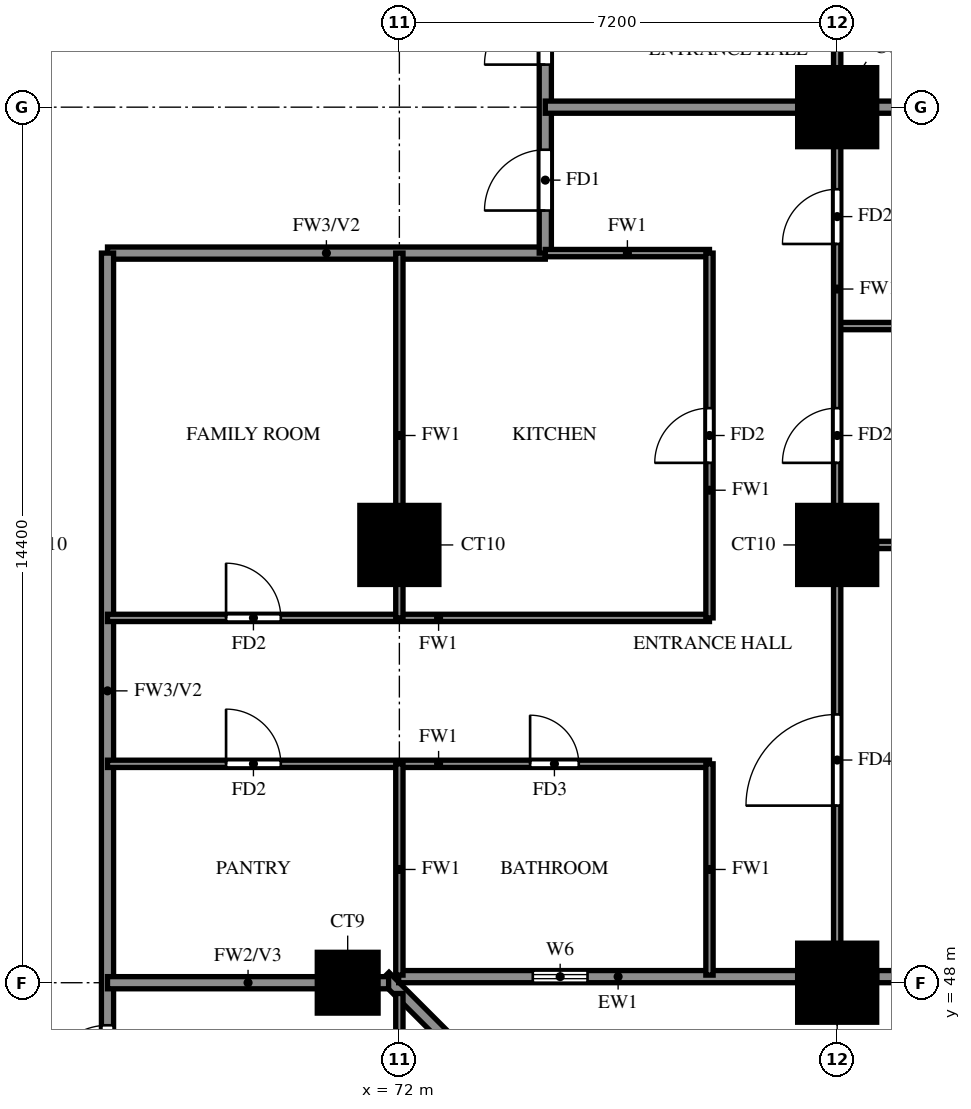
"""IFC4 building model, lengths in metres.
Left out: names, types, materials, properties, quantities, classifications, styles, units other than length and angle.
Written with IfcOpenShell. Run it as: python <this file> out.ifc"""

import sys

from ifc_helpers import new_model, si_unit, direction, frame, frame_2d, origin, origin_2d, place, context, subcontext, project, spatial, rectangle, extrude, source, transform, mapped, element, fill, save


model = new_model("IFC4")
c1 = context("Model", 3, precision=1e-05, world=origin(), true_north=direction((0.0, 1.0)))
c2 = subcontext(c1, "Body", "Model", "MODEL_VIEW")
j1 = project(units=[si_unit("LENGTHUNIT", "METRE"), si_unit("PLANEANGLEUNIT", "RADIAN")], contexts=[c1])
p1 = place(None, origin())
s1 = spatial("IfcSite", under=j1, at=p1, CompositionType="ELEMENT")
p2 = place(p1, origin())
s2 = spatial("IfcBuilding", under=s1, at=p2, CompositionType="ELEMENT")
p3 = place(p2, frame((0.0, 0.0, 79.5)))
s3 = spatial("IfcBuildingStorey", under=s2, at=p3, CompositionType="ELEMENT", Elevation=79.5)
m1 = source(origin(), c2, "Body", "SweptSolid", [
    extrude(rectangle(XDim=1.0, YDim=1.0, at=origin_2d()), origin(), (0.0, 0.0, 1.0), 3.18),
])
p4 = place(p3, frame((71.15, 48.0, 0.0), z_axis=(0.0, 0.0, 1.0), x_axis=(1.0, 0.0, 0.0)))
e1 = element("IfcColumn", 1, at=p4, inside=s3, PredefinedType="COLUMN", context=c2, shape_type="MappedRepresentation", body=[
    mapped(m1, transform((0.0, 0.0, 0.0))),
])
m2 = source(origin(), c2, "Body", "SweptSolid", [
    extrude(rectangle(XDim=1.3, YDim=1.3, at=origin_2d()), origin(), (0.0, 0.0, 1.0), 3.18),
])
for number, where, z_axis, x_axis in (
    (2, (79.2, 48.0, 0.0), (0.0, 0.0, 1.0), (1.0, 0.0, 0.0)),
    (3, (72.0, 55.2, 0.0), (0.0, 0.0, 1.0), (1.0, 0.0, 0.0)),
    (4, (79.2, 55.2, 0.0), (0.0, 0.0, 1.0), (1.0, 0.0, 0.0)),
    (5, (79.2, 62.4, 0.0), (0.0, 0.0, 1.0), (1.0, 0.0, 0.0)),
):
    element("IfcColumn", number, at=place(p3, frame(where, z_axis=z_axis, x_axis=x_axis)), inside=s3, PredefinedType="COLUMN", context=c2, shape_type="MappedRepresentation", body=[
        mapped(m2, transform((0.0, 0.0, 0.0))),
    ])
p5 = place(p3, frame((85.996, 33.863, 0.0), z_axis=(0.0, 0.0, 1.0), x_axis=(-0.707100718496, 0.707112843825, 0.0)))
e6 = element("IfcWall", 6, at=p5, inside=s3, PredefinedType="SOLIDWALL", context=c2, shape_type="SweptSolid", body=[
    extrude(rectangle(XDim=20.135, YDim=0.2, at=frame_2d((10.067, 0.0))), origin(), (0.0, 0.0, 1.0), 3.18),
])
p6 = place(p3, frame((71.989, 48.1, 0.0), z_axis=(0.0, 0.0, 1.0), x_axis=(1.0, 0.0, 0.0)))
e7 = element("IfcWall", 7, at=p6, inside=s3, PredefinedType="SOLIDWALL", context=c2, shape_type="SweptSolid", body=[
    extrude(rectangle(XDim=6.562, YDim=0.2, at=frame_2d((3.281, 0.0))), origin(), (0.0, 0.0, 1.0), 3.18),
])
p7 = place(p6, frame((2.206, 0.0, 1.5)))
e8 = element("IfcOpeningElement", 8, at=p7, cuts=e7, PredefinedType="OPENING", context=c2, shape_type="SweptSolid", body=[
    extrude(rectangle(XDim=0.9, YDim=0.9, at=frame_2d((0.45, 0.45))), frame((0.0, 0.11, 0.0), z_axis=(0.0, -1.0, 0.0), x_axis=(1.0, 0.0, 0.0)), (0.0, 0.0, 1.0), 0.22),
])
p8 = place(p3, frame((79.85, 48.1, 0.0), z_axis=(0.0, 0.0, 1.0), x_axis=(1.0, 0.0, 0.0)))
e9 = element("IfcWall", 9, at=p8, inside=s3, PredefinedType="SOLIDWALL", context=c2, shape_type="SweptSolid", body=[
    extrude(rectangle(XDim=5.45, YDim=0.2, at=frame_2d((2.725, 0.0))), origin(), (0.0, 0.0, 1.0), 3.18),
])
p9 = place(p8, frame((1.525, 0.0, 0.6)))
e10 = element("IfcOpeningElement", 10, at=p9, cuts=e9, PredefinedType="OPENING", context=c2, shape_type="SweptSolid", body=[
    extrude(rectangle(XDim=2.4, YDim=2.4, at=frame_2d((1.2, 1.2))), frame((0.0, 0.11, 0.0), z_axis=(0.0, -1.0, 0.0), x_axis=(1.0, 0.0, 0.0)), (0.0, 0.0, 1.0), 0.22),
])
p10 = place(p3, frame((67.2, 60.0, 0.0), z_axis=(0.0, 0.0, 1.0), x_axis=(1.0, 0.0, 0.0)))
e11 = element("IfcWall", 11, at=p10, inside=s3, PredefinedType="SOLIDWALL", context=c2, shape_type="SweptSolid", body=[
    extrude(rectangle(XDim=7.2, YDim=0.2, at=frame_2d((3.6, 0.0))), origin(), (0.0, 0.0, 1.0), 3.18),
])
p11 = place(p3, frame((67.2, 45.6, 0.0), z_axis=(0.0, 0.0, 1.0), x_axis=(0.0, 1.0, 0.0)))
e12 = element("IfcWall", 12, at=p11, inside=s3, PredefinedType="SOLIDWALL", context=c2, shape_type="SweptSolid", body=[
    extrude(rectangle(XDim=14.4, YDim=0.2, at=frame_2d((7.2, 0.0))), origin(), (0.0, 0.0, 1.0), 3.18),
])
p12 = place(p11, frame((0.7, 0.0, 0.0)))
e13 = element("IfcOpeningElement", 13, at=p12, cuts=e12, PredefinedType="OPENING", context=c2, shape_type="SweptSolid", body=[
    extrude(rectangle(XDim=1.0, YDim=2.1, at=frame_2d((0.5, 1.05))), frame((0.0, 0.11, 0.0), z_axis=(0.0, -1.0, 0.0), x_axis=(1.0, 0.0, 0.0)), (0.0, 0.0, 1.0), 0.22),
])
p13 = place(p3, frame((74.4, 60.0, 0.0), z_axis=(0.0, 0.0, 1.0), x_axis=(0.0, 1.0, 0.0)))
e14 = element("IfcWall", 14, at=p13, inside=s3, PredefinedType="SOLIDWALL", context=c2, shape_type="SweptSolid", body=[
    extrude(rectangle(XDim=9.45, YDim=0.2, at=frame_2d((4.725, 0.0))), origin(), (0.0, 0.0, 1.0), 3.18),
])
p14 = place(p13, frame((0.7, 0.0, 0.0)))
e15 = element("IfcOpeningElement", 15, at=p14, cuts=e14, PredefinedType="OPENING", context=c2, shape_type="SweptSolid", body=[
    extrude(rectangle(XDim=1.0, YDim=2.1, at=frame_2d((0.5, 1.05))), frame((0.0, 0.11, 0.0), z_axis=(0.0, -1.0, 0.0), x_axis=(1.0, 0.0, 0.0)), (0.0, 0.0, 1.0), 0.22),
])
p15 = place(p13, frame((3.1, 0.0, 0.0)))
e16 = element("IfcOpeningElement", 16, at=p15, cuts=e14, PredefinedType="OPENING", context=c2, shape_type="SweptSolid", body=[
    extrude(rectangle(XDim=1.0, YDim=2.1, at=frame_2d((0.5, 1.05))), frame((0.0, 0.11, 0.0), z_axis=(0.0, -1.0, 0.0), x_axis=(1.0, 0.0, 0.0)), (0.0, 0.0, 1.0), 0.22),
])
p16 = place(p3, frame((67.2, 48.0, 0.0), z_axis=(0.0, 0.0, 1.0), x_axis=(1.0, 0.0, 0.0)))
e17 = element("IfcWall", 17, at=p16, inside=s3, PredefinedType="SOLIDWALL", context=c2, shape_type="SweptSolid", body=[
    extrude(rectangle(XDim=4.623, YDim=0.2, at=frame_2d((2.312, 0.0))), origin(), (0.0, 0.0, 1.0), 3.18),
])
p17 = place(p3, frame((74.4, 62.4, 0.0), z_axis=(0.0, 0.0, 1.0), x_axis=(1.0, 0.0, 0.0)))
e18 = element("IfcWall", 18, at=p17, inside=s3, PredefinedType="SOLIDWALL", context=c2, shape_type="SweptSolid", body=[
    extrude(rectangle(XDim=11.875, YDim=0.2, at=frame_2d((5.938, 0.0))), origin(), (0.0, 0.0, 1.0), 3.18),
])
p18 = place(p3, frame((67.2, 51.6, 0.0), z_axis=(0.0, 0.0, 1.0), x_axis=(1.0, 0.0, 0.0)))
e19 = element("IfcWall", 19, at=p18, inside=s3, PredefinedType="PARTITIONING", context=c2, shape_type="SweptSolid", body=[
    extrude(rectangle(XDim=9.9, YDim=0.12, at=frame_2d((4.95, 0.0))), origin(), (0.0, 0.0, 1.0), 3.18),
])
p19 = place(p18, frame((6.95, 0.0, 0.0)))
e20 = element("IfcOpeningElement", 20, at=p19, cuts=e19, PredefinedType="OPENING", context=c2, shape_type="SweptSolid", body=[
    extrude(rectangle(XDim=0.8, YDim=2.1, at=frame_2d((0.4, 1.05))), frame((0.0, 0.07, 0.0), z_axis=(0.0, -1.0, 0.0), x_axis=(1.0, 0.0, 0.0)), (0.0, 0.0, 1.0), 0.14),
])
p20 = place(p18, frame((1.95, 0.0, 0.0)))
e21 = element("IfcOpeningElement", 21, at=p20, cuts=e19, PredefinedType="OPENING", context=c2, shape_type="SweptSolid", body=[
    extrude(rectangle(XDim=0.9, YDim=2.1, at=frame_2d((0.45, 1.05))), frame((0.0, 0.07, 0.0), z_axis=(0.0, -1.0, 0.0), x_axis=(1.0, 0.0, 0.0)), (0.0, 0.0, 1.0), 0.14),
])
p21 = place(p3, frame((67.2, 54.0, 0.0), z_axis=(0.0, 0.0, 1.0), x_axis=(1.0, 0.0, 0.0)))
e22 = element("IfcWall", 22, at=p21, inside=s3, PredefinedType="PARTITIONING", context=c2, shape_type="SweptSolid", body=[
    extrude(rectangle(XDim=9.9, YDim=0.12, at=frame_2d((4.95, 0.0))), origin(), (0.0, 0.0, 1.0), 3.18),
])
p22 = place(p21, frame((1.95, 0.0, 0.0)))
e23 = element("IfcOpeningElement", 23, at=p22, cuts=e22, PredefinedType="OPENING", context=c2, shape_type="SweptSolid", body=[
    extrude(rectangle(XDim=0.9, YDim=2.1, at=frame_2d((0.45, 1.05))), frame((0.0, 0.07, 0.0), z_axis=(0.0, -1.0, 0.0), x_axis=(1.0, 0.0, 0.0)), (0.0, 0.0, 1.0), 0.14),
])
p23 = place(p3, frame((79.2, 55.2, 0.0), z_axis=(0.0, 0.0, 1.0), x_axis=(1.0, 0.0, 0.0)))
e24 = element("IfcWall", 24, at=p23, inside=s3, PredefinedType="PARTITIONING", context=c2, shape_type="SweptSolid", body=[
    extrude(rectangle(XDim=7.075, YDim=0.12, at=frame_2d((3.538, 0.0))), origin(), (0.0, 0.0, 1.0), 3.18),
])
p24 = place(p3, frame((79.2, 58.8, 0.0), z_axis=(0.0, 0.0, 1.0), x_axis=(1.0, 0.0, 0.0)))
e25 = element("IfcWall", 25, at=p24, inside=s3, PredefinedType="PARTITIONING", context=c2, shape_type="SweptSolid", body=[
    extrude(rectangle(XDim=7.075, YDim=0.12, at=frame_2d((3.538, 0.0))), origin(), (0.0, 0.0, 1.0), 2.28),
])
p25 = place(p3, frame((74.4, 60.0, 0.0), z_axis=(0.0, 0.0, 1.0), x_axis=(1.0, 0.0, 0.0)))
e26 = element("IfcWall", 26, at=p25, inside=s3, PredefinedType="PARTITIONING", context=c2, shape_type="SweptSolid", body=[
    extrude(rectangle(XDim=2.7, YDim=0.12, at=frame_2d((1.35, 0.0))), origin(), (0.0, 0.0, 1.0), 3.18),
])
p26 = place(p3, frame((72.0, 33.725, 0.0), z_axis=(0.0, 0.0, 1.0), x_axis=(0.0, 1.0, 0.0)))
e27 = element("IfcWall", 27, at=p26, inside=s3, PredefinedType="PARTITIONING", context=c2, shape_type="SweptSolid", body=[
    extrude(rectangle(XDim=14.098, YDim=0.12, at=frame_2d((7.049, 0.0))), origin(), (0.0, 0.0, 1.0), 2.28),
])
p27 = place(p26, frame((10.075, 0.0, 0.0)))
e28 = element("IfcOpeningElement", 28, at=p27, cuts=e27, PredefinedType="OPENING", context=c2, shape_type="SweptSolid", body=[
    extrude(rectangle(XDim=0.9, YDim=2.1, at=frame_2d((0.45, 1.05))), frame((0.0, 0.07, 0.0), z_axis=(0.0, -1.0, 0.0), x_axis=(1.0, 0.0, 0.0)), (0.0, 0.0, 1.0), 0.14),
])
p28 = place(p3, frame((72.0, 48.125, 0.0), z_axis=(0.0, 0.0, 1.0), x_axis=(0.0, 1.0, 0.0)))
e29 = element("IfcWall", 29, at=p28, inside=s3, PredefinedType="PARTITIONING", context=c2, shape_type="SweptSolid", body=[
    extrude(rectangle(XDim=3.475, YDim=0.12, at=frame_2d((1.738, 0.0))), origin(), (0.0, 0.0, 1.0), 3.18),
])
p29 = place(p3, frame((72.0, 54.0, 0.0), z_axis=(0.0, 0.0, 1.0), x_axis=(0.0, 1.0, 0.0)))
e30 = element("IfcWall", 30, at=p29, inside=s3, PredefinedType="PARTITIONING", context=c2, shape_type="SweptSolid", body=[
    extrude(rectangle(XDim=6.0, YDim=0.12, at=frame_2d((3.0, 0.0))), origin(), (0.0, 0.0, 1.0), 3.18),
])
p30 = place(p3, frame((77.1, 48.125, 0.0), z_axis=(0.0, 0.0, 1.0), x_axis=(0.0, 1.0, 0.0)))
e31 = element("IfcWall", 31, at=p30, inside=s3, PredefinedType="PARTITIONING", context=c2, shape_type="SweptSolid", body=[
    extrude(rectangle(XDim=3.475, YDim=0.12, at=frame_2d((1.738, 0.0))), origin(), (0.0, 0.0, 1.0), 3.18),
])
p31 = place(p3, frame((77.1, 54.0, 0.0), z_axis=(0.0, 0.0, 1.0), x_axis=(0.0, 1.0, 0.0)))
e32 = element("IfcWall", 32, at=p31, inside=s3, PredefinedType="PARTITIONING", context=c2, shape_type="SweptSolid", body=[
    extrude(rectangle(XDim=6.0, YDim=0.12, at=frame_2d((3.0, 0.0))), origin(), (0.0, 0.0, 1.0), 3.18),
])
p32 = place(p31, frame((2.55, 0.0, 0.0)))
e33 = element("IfcOpeningElement", 33, at=p32, cuts=e32, PredefinedType="OPENING", context=c2, shape_type="SweptSolid", body=[
    extrude(rectangle(XDim=0.9, YDim=2.1, at=frame_2d((0.45, 1.05))), frame((0.0, 0.07, 0.0), z_axis=(0.0, -1.0, 0.0), x_axis=(1.0, 0.0, 0.0)), (0.0, 0.0, 1.0), 0.14),
])
p33 = place(p3, frame((79.2, 48.125, 0.0), z_axis=(0.0, 0.0, 1.0), x_axis=(0.0, 1.0, 0.0)))
e34 = element("IfcWall", 34, at=p33, inside=s3, PredefinedType="PARTITIONING", context=c2, shape_type="SweptSolid", body=[
    extrude(rectangle(XDim=25.075, YDim=0.12, at=frame_2d((12.538, 0.0))), origin(), (0.0, 0.0, 1.0), 3.18),
])
p34 = place(p33, frame((2.788, 0.0, 0.0)))
e35 = element("IfcOpeningElement", 35, at=p34, cuts=e34, PredefinedType="OPENING", context=c2, shape_type="SweptSolid", body=[
    extrude(rectangle(XDim=1.5, YDim=2.1, at=frame_2d((0.75, 1.05))), frame((0.0, 0.07, 0.0), z_axis=(0.0, -1.0, 0.0), x_axis=(1.0, 0.0, 0.0)), (0.0, 0.0, 1.0), 0.14),
])
p35 = place(p33, frame((8.425, 0.0, 0.0)))
e36 = element("IfcOpeningElement", 36, at=p35, cuts=e34, PredefinedType="OPENING", context=c2, shape_type="SweptSolid", body=[
    extrude(rectangle(XDim=0.9, YDim=2.1, at=frame_2d((0.45, 1.05))), frame((0.0, 0.07, 0.0), z_axis=(0.0, -1.0, 0.0), x_axis=(1.0, 0.0, 0.0)), (0.0, 0.0, 1.0), 0.14),
])
p36 = place(p33, frame((12.025, 0.0, 0.0)))
e37 = element("IfcOpeningElement", 37, at=p36, cuts=e34, PredefinedType="OPENING", context=c2, shape_type="SweptSolid", body=[
    extrude(rectangle(XDim=0.9, YDim=2.1, at=frame_2d((0.45, 1.05))), frame((0.0, 0.07, 0.0), z_axis=(0.0, -1.0, 0.0), x_axis=(1.0, 0.0, 0.0)), (0.0, 0.0, 1.0), 0.14),
])
p37 = place(p33, frame((15.625, 0.0, 0.0)))
e38 = element("IfcOpeningElement", 38, at=p37, cuts=e34, PredefinedType="OPENING", context=c2, shape_type="SweptSolid", body=[
    extrude(rectangle(XDim=0.9, YDim=2.1, at=frame_2d((0.45, 1.05))), frame((0.0, 0.07, 0.0), z_axis=(0.0, -1.0, 0.0), x_axis=(1.0, 0.0, 0.0)), (0.0, 0.0, 1.0), 0.14),
])
p38 = place(p33, frame((19.225, 0.0, 0.0)))
e39 = element("IfcOpeningElement", 39, at=p38, cuts=e34, PredefinedType="OPENING", context=c2, shape_type="SweptSolid", body=[
    extrude(rectangle(XDim=0.9, YDim=2.1, at=frame_2d((0.45, 1.05))), frame((0.0, 0.07, 0.0), z_axis=(0.0, -1.0, 0.0), x_axis=(1.0, 0.0, 0.0)), (0.0, 0.0, 1.0), 0.14),
])
p39 = place(p33, frame((22.825, 0.0, 0.0)))
e40 = element("IfcOpeningElement", 40, at=p39, cuts=e34, PredefinedType="OPENING", context=c2, shape_type="SweptSolid", body=[
    extrude(rectangle(XDim=0.9, YDim=2.1, at=frame_2d((0.45, 1.05))), frame((0.0, 0.07, 0.0), z_axis=(0.0, -1.0, 0.0), x_axis=(1.0, 0.0, 0.0)), (0.0, 0.0, 1.0), 0.14),
])
p40 = place(p7, origin())
e41 = element("IfcWindow", 41, at=p40, inside=s3, PartitioningType="SINGLE_PANEL", PredefinedType="WINDOW", context=c2, shape_type="SweptSolid", body=[
    extrude(rectangle(XDim=0.9, YDim=0.9, at=frame_2d((0.45, 0.45))), frame((0.0, 0.03, 0.0), z_axis=(0.0, -1.0, 0.0), x_axis=(1.0, 0.0, 0.0)), (0.0, 0.0, 1.0), 0.06),
])
fill(e8, e41)
p41 = place(p14, origin())
e42 = element("IfcDoor", 42, at=p41, inside=s3, OperationType="SINGLE_SWING_LEFT", PredefinedType="DOOR", context=c2, shape_type="SweptSolid", body=[
    extrude(rectangle(XDim=1.0, YDim=2.1, at=frame_2d((0.5, 1.05))), frame((0.0, 0.025, 0.0), z_axis=(0.0, -1.0, 0.0), x_axis=(1.0, 0.0, 0.0)), (0.0, 0.0, 1.0), 0.05),
])
fill(e15, e42)
p42 = place(p34, origin())
e43 = element("IfcDoor", 43, at=p42, inside=s3, OperationType="SINGLE_SWING_LEFT", PredefinedType="DOOR", context=c2, shape_type="SweptSolid", body=[
    extrude(rectangle(XDim=1.5, YDim=2.1, at=frame_2d((0.75, 1.05))), frame((0.0, 0.025, 0.0), z_axis=(0.0, -1.0, 0.0), x_axis=(1.0, 0.0, 0.0)), (0.0, 0.0, 1.0), 0.05),
])
fill(e35, e43)
p43 = place(p35, origin())
e44 = element("IfcDoor", 44, at=p43, inside=s3, OperationType="SINGLE_SWING_RIGHT", PredefinedType="DOOR", context=c2, shape_type="SweptSolid", body=[
    extrude(rectangle(XDim=0.9, YDim=2.1, at=frame_2d((0.45, 1.05))), frame((0.0, 0.025, 0.0), z_axis=(0.0, -1.0, 0.0), x_axis=(1.0, 0.0, 0.0)), (0.0, 0.0, 1.0), 0.05),
])
fill(e36, e44)
p44 = place(p36, origin())
e45 = element("IfcDoor", 45, at=p44, inside=s3, OperationType="SINGLE_SWING_LEFT", PredefinedType="DOOR", context=c2, shape_type="SweptSolid", body=[
    extrude(rectangle(XDim=0.9, YDim=2.1, at=frame_2d((0.45, 1.05))), frame((0.0, 0.025, 0.0), z_axis=(0.0, -1.0, 0.0), x_axis=(1.0, 0.0, 0.0)), (0.0, 0.0, 1.0), 0.05),
])
fill(e37, e45)
p45 = place(p19, origin())
e46 = element("IfcDoor", 46, at=p45, inside=s3, OperationType="SINGLE_SWING_LEFT", PredefinedType="DOOR", context=c2, shape_type="SweptSolid", body=[
    extrude(rectangle(XDim=0.8, YDim=2.1, at=frame_2d((0.4, 1.05))), frame((0.0, 0.025, 0.0), z_axis=(0.0, -1.0, 0.0), x_axis=(1.0, 0.0, 0.0)), (0.0, 0.0, 1.0), 0.05),
])
fill(e20, e46)
p46 = place(p32, origin())
e47 = element("IfcDoor", 47, at=p46, inside=s3, OperationType="SINGLE_SWING_RIGHT", PredefinedType="DOOR", context=c2, shape_type="SweptSolid", body=[
    extrude(rectangle(XDim=0.9, YDim=2.1, at=frame_2d((0.45, 1.05))), frame((0.0, 0.025, 0.0), z_axis=(0.0, -1.0, 0.0), x_axis=(1.0, 0.0, 0.0)), (0.0, 0.0, 1.0), 0.05),
])
fill(e33, e47)
p47 = place(p20, origin())
e48 = element("IfcDoor", 48, at=p47, inside=s3, OperationType="SINGLE_SWING_LEFT", PredefinedType="DOOR", context=c2, shape_type="SweptSolid", body=[
    extrude(rectangle(XDim=0.9, YDim=2.1, at=frame_2d((0.45, 1.05))), frame((0.0, 0.025, 0.0), z_axis=(0.0, -1.0, 0.0), x_axis=(1.0, 0.0, 0.0)), (0.0, 0.0, 1.0), 0.05),
])
fill(e21, e48)
p48 = place(p22, origin())
e49 = element("IfcDoor", 49, at=p48, inside=s3, OperationType="SINGLE_SWING_LEFT", PredefinedType="DOOR", context=c2, shape_type="SweptSolid", body=[
    extrude(rectangle(XDim=0.9, YDim=2.1, at=frame_2d((0.45, 1.05))), frame((0.0, 0.025, 0.0), z_axis=(0.0, -1.0, 0.0), x_axis=(1.0, 0.0, 0.0)), (0.0, 0.0, 1.0), 0.05),
])
fill(e23, e49)
p49 = place(p15, origin())
e50 = element("IfcDoor", 50, at=p49, inside=s3, OperationType="SINGLE_SWING_LEFT", PredefinedType="DOOR", context=c2, shape_type="SweptSolid", body=[
    extrude(rectangle(XDim=1.0, YDim=2.1, at=frame_2d((0.5, 1.05))), frame((0.0, 0.025, 0.0), z_axis=(0.0, -1.0, 0.0), x_axis=(1.0, 0.0, 0.0)), (0.0, 0.0, 1.0), 0.05),
])
fill(e16, e50)
p50 = place(p12, origin())
e51 = element("IfcDoor", 51, at=p50, inside=s3, OperationType="SINGLE_SWING_RIGHT", PredefinedType="DOOR", context=c2, shape_type="SweptSolid", body=[
    extrude(rectangle(XDim=1.0, YDim=2.1, at=frame_2d((0.5, 1.05))), frame((0.0, 0.025, 0.0), z_axis=(0.0, -1.0, 0.0), x_axis=(1.0, 0.0, 0.0)), (0.0, 0.0, 1.0), 0.05),
])
fill(e13, e51)
save(model, sys.argv[1])
